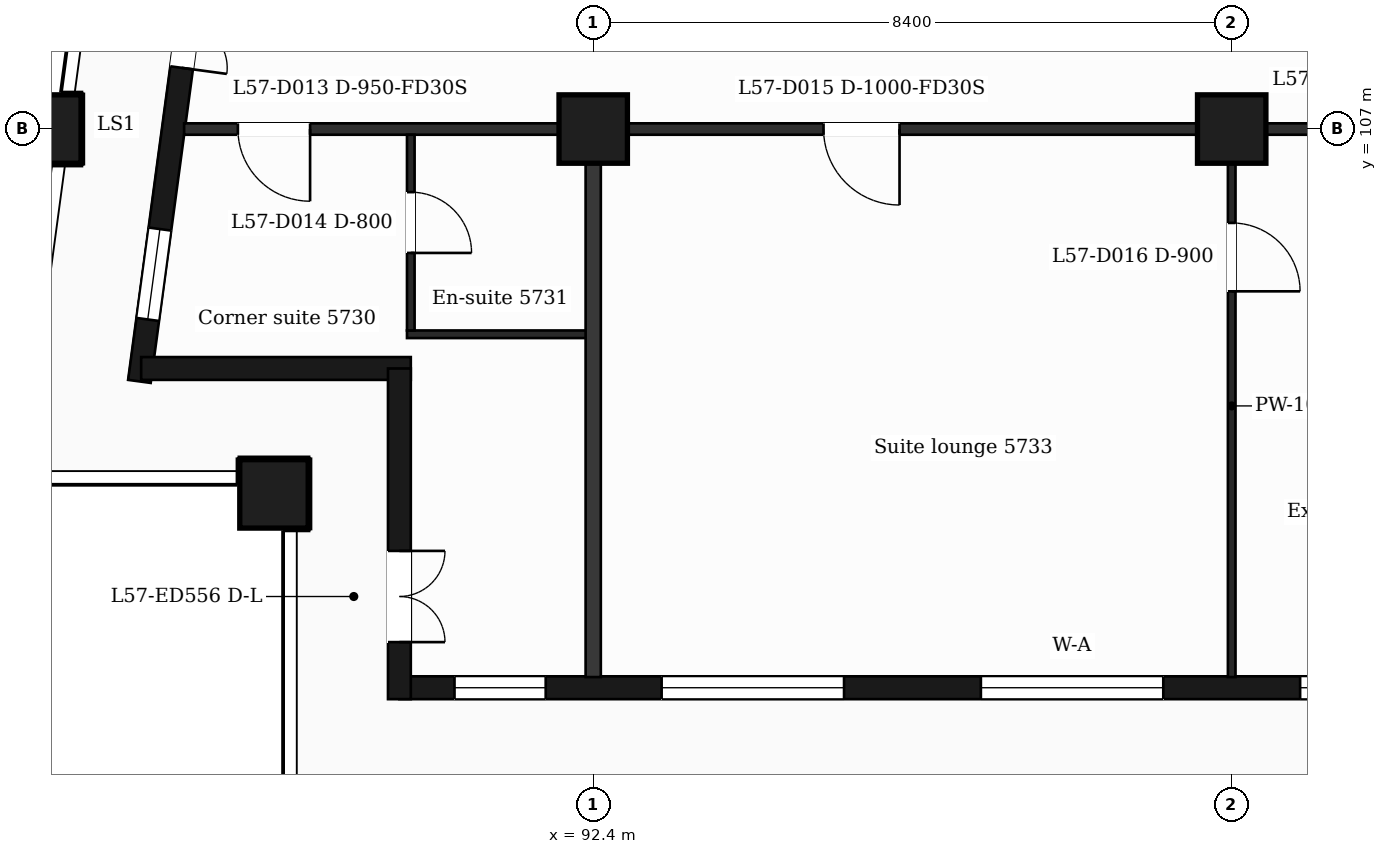
"""IFC4 building model, lengths in metres.
Left out: names, types, materials, properties, quantities, classifications, styles, units other than length and angle.
Written with IfcOpenShell. Run it as: python <this file> out.ifc"""

import sys

from ifc_helpers import new_model, si_unit, direction, frame, frame_2d, origin, origin_2d, place, context, subcontext, project, spatial, rectangle, extrude, element, fill, save


model = new_model("IFC4")
c1 = context("Model", 3, precision=1e-05, world=origin(), true_north=direction((0.0, 1.0)))
c2 = subcontext(c1, "Body", "Model", "MODEL_VIEW")
j1 = project(units=[si_unit("LENGTHUNIT", "METRE"), si_unit("PLANEANGLEUNIT", "RADIAN")], contexts=[c1])
p1 = place(None, origin())
s1 = spatial("IfcSite", under=j1, at=p1, CompositionType="ELEMENT")
p2 = place(p1, origin())
s2 = spatial("IfcBuilding", under=s1, at=p2, CompositionType="ELEMENT")
p3 = place(p2, frame((0.0, 0.0, 235.5)))
s3 = spatial("IfcBuildingStorey", under=s2, at=p3, CompositionType="ELEMENT", Elevation=235.5)
for number, where, z_axis, x_axis in (
    (1, (88.2, 102.2, 0.0), (0.0, 0.0, 1.0), (1.0, 0.0, 0.0)),
    (2, (92.4, 107.0, 0.0), (0.0, 0.0, 1.0), (1.0, 0.0, 0.0)),
    (3, (100.8, 107.0, 0.0), (0.0, 0.0, 1.0), (1.0, 0.0, 0.0)),
    (4, (85.211, 107.0, 0.0), (0.0, 0.0, 1.0), (1.0, 0.0, 0.0)),
):
    element("IfcColumn", number, at=place(p3, frame(where, z_axis=z_axis, x_axis=x_axis)), inside=s3, PredefinedType="COLUMN", context=c2, shape_type="SweptSolid", body=[
        extrude(rectangle(XDim=0.9, YDim=0.9, at=origin_2d()), origin(), (0.0, 0.0, 1.0), 3.7),
    ])
p4 = place(p3, frame((89.85, 99.65, 0.0), z_axis=(0.0, 0.0, 1.0), x_axis=(1.0, 0.0, 0.0)))
e5 = element("IfcWall", 5, at=p4, inside=s3, PredefinedType="SOLIDWALL", context=c2, shape_type="SweptSolid", body=[
    extrude(rectangle(XDim=47.25, YDim=0.3, at=frame_2d((23.625, 0.0))), origin(), (0.0, 0.0, 1.0), 3.38),
])
p5 = place(p4, frame((0.725, 0.0, 0.9)))
e6 = element("IfcOpeningElement", 6, at=p5, cuts=e5, PredefinedType="OPENING", context=c2, shape_type="SweptSolid", body=[
    extrude(rectangle(XDim=1.2, YDim=2.1, at=frame_2d((0.6, 1.05))), frame((0.0, 0.16, 0.0), z_axis=(0.0, -1.0, 0.0), x_axis=(1.0, 0.0, 0.0)), (0.0, 0.0, 1.0), 0.32),
])
p6 = place(p4, frame((3.45, 0.0, 0.9)))
e7 = element("IfcOpeningElement", 7, at=p6, cuts=e5, PredefinedType="OPENING", context=c2, shape_type="SweptSolid", body=[
    extrude(rectangle(XDim=2.4, YDim=2.1, at=frame_2d((1.2, 1.05))), frame((0.0, 0.16, 0.0), z_axis=(0.0, -1.0, 0.0), x_axis=(1.0, 0.0, 0.0)), (0.0, 0.0, 1.0), 0.32),
])
p7 = place(p4, frame((7.65, 0.0, 0.9)))
e8 = element("IfcOpeningElement", 8, at=p7, cuts=e5, PredefinedType="OPENING", context=c2, shape_type="SweptSolid", body=[
    extrude(rectangle(XDim=2.4, YDim=2.1, at=frame_2d((1.2, 1.05))), frame((0.0, 0.16, 0.0), z_axis=(0.0, -1.0, 0.0), x_axis=(1.0, 0.0, 0.0)), (0.0, 0.0, 1.0), 0.32),
])
p8 = place(p4, frame((11.85, 0.0, 0.9)))
e9 = element("IfcOpeningElement", 9, at=p8, cuts=e5, PredefinedType="OPENING", context=c2, shape_type="SweptSolid", body=[
    extrude(rectangle(XDim=2.4, YDim=2.1, at=frame_2d((1.2, 1.05))), frame((0.0, 0.16, 0.0), z_axis=(0.0, -1.0, 0.0), x_axis=(1.0, 0.0, 0.0)), (0.0, 0.0, 1.0), 0.32),
])
p9 = place(p4, frame((16.05, 0.0, 0.9)))
e10 = element("IfcOpeningElement", 10, at=p9, cuts=e5, PredefinedType="OPENING", context=c2, shape_type="SweptSolid", body=[
    extrude(rectangle(XDim=2.4, YDim=2.1, at=frame_2d((1.2, 1.05))), frame((0.0, 0.16, 0.0), z_axis=(0.0, -1.0, 0.0), x_axis=(1.0, 0.0, 0.0)), (0.0, 0.0, 1.0), 0.32),
])
p10 = place(p4, frame((20.25, 0.0, 0.9)))
e11 = element("IfcOpeningElement", 11, at=p10, cuts=e5, PredefinedType="OPENING", context=c2, shape_type="SweptSolid", body=[
    extrude(rectangle(XDim=2.4, YDim=2.1, at=frame_2d((1.2, 1.05))), frame((0.0, 0.16, 0.0), z_axis=(0.0, -1.0, 0.0), x_axis=(1.0, 0.0, 0.0)), (0.0, 0.0, 1.0), 0.32),
])
p11 = place(p4, frame((25.05, 0.0, 0.9)))
e12 = element("IfcOpeningElement", 12, at=p11, cuts=e5, PredefinedType="OPENING", context=c2, shape_type="SweptSolid", body=[
    extrude(rectangle(XDim=1.2, YDim=2.1, at=frame_2d((0.6, 1.05))), frame((0.0, 0.16, 0.0), z_axis=(0.0, -1.0, 0.0), x_axis=(1.0, 0.0, 0.0)), (0.0, 0.0, 1.0), 0.32),
])
p12 = place(p4, frame((29.25, 0.0, 0.9)))
e13 = element("IfcOpeningElement", 13, at=p12, cuts=e5, PredefinedType="OPENING", context=c2, shape_type="SweptSolid", body=[
    extrude(rectangle(XDim=1.2, YDim=2.1, at=frame_2d((0.6, 1.05))), frame((0.0, 0.16, 0.0), z_axis=(0.0, -1.0, 0.0), x_axis=(1.0, 0.0, 0.0)), (0.0, 0.0, 1.0), 0.32),
])
p13 = place(p4, frame((32.55, 0.0, 0.0)))
e14 = element("IfcOpeningElement", 14, at=p13, cuts=e5, PredefinedType="OPENING", context=c2, shape_type="SweptSolid", body=[
    extrude(rectangle(XDim=1.2, YDim=2.4, at=frame_2d((0.6, 1.2))), frame((0.0, 0.16, 0.0), z_axis=(0.0, -1.0, 0.0), x_axis=(1.0, 0.0, 0.0)), (0.0, 0.0, 1.0), 0.32),
])
p14 = place(p4, frame((34.35, 0.0, 0.9)))
e15 = element("IfcOpeningElement", 15, at=p14, cuts=e5, PredefinedType="OPENING", context=c2, shape_type="SweptSolid", body=[
    extrude(rectangle(XDim=1.2, YDim=2.1, at=frame_2d((0.6, 1.05))), frame((0.0, 0.16, 0.0), z_axis=(0.0, -1.0, 0.0), x_axis=(1.0, 0.0, 0.0)), (0.0, 0.0, 1.0), 0.32),
])
p15 = place(p4, frame((37.05, 0.0, 0.9)))
e16 = element("IfcOpeningElement", 16, at=p15, cuts=e5, PredefinedType="OPENING", context=c2, shape_type="SweptSolid", body=[
    extrude(rectangle(XDim=2.4, YDim=2.1, at=frame_2d((1.2, 1.05))), frame((0.0, 0.16, 0.0), z_axis=(0.0, -1.0, 0.0), x_axis=(1.0, 0.0, 0.0)), (0.0, 0.0, 1.0), 0.32),
])
p16 = place(p4, frame((40.95, 0.0, 0.0)))
e17 = element("IfcOpeningElement", 17, at=p16, cuts=e5, PredefinedType="OPENING", context=c2, shape_type="SweptSolid", body=[
    extrude(rectangle(XDim=1.2, YDim=2.4, at=frame_2d((0.6, 1.2))), frame((0.0, 0.16, 0.0), z_axis=(0.0, -1.0, 0.0), x_axis=(1.0, 0.0, 0.0)), (0.0, 0.0, 1.0), 0.32),
])
p17 = place(p4, frame((42.75, 0.0, 0.9)))
e18 = element("IfcOpeningElement", 18, at=p17, cuts=e5, PredefinedType="OPENING", context=c2, shape_type="SweptSolid", body=[
    extrude(rectangle(XDim=1.2, YDim=2.1, at=frame_2d((0.6, 1.05))), frame((0.0, 0.16, 0.0), z_axis=(0.0, -1.0, 0.0), x_axis=(1.0, 0.0, 0.0)), (0.0, 0.0, 1.0), 0.32),
])
p18 = place(p4, frame((45.25, 0.0, 0.9)))
e19 = element("IfcOpeningElement", 19, at=p18, cuts=e5, PredefinedType="OPENING", context=c2, shape_type="SweptSolid", body=[
    extrude(rectangle(XDim=1.2, YDim=2.1, at=frame_2d((0.6, 1.05))), frame((0.0, 0.16, 0.0), z_axis=(0.0, -1.0, 0.0), x_axis=(1.0, 0.0, 0.0)), (0.0, 0.0, 1.0), 0.32),
])
p19 = place(p3, frame((87.334, 110.4, 0.0), z_axis=(0.0, 0.0, 1.0), x_axis=(-0.133437175554, -0.991057273915, 0.0)))
e20 = element("IfcWall", 20, at=p19, inside=s3, PredefinedType="SOLIDWALL", context=c2, shape_type="SweptSolid", body=[
    extrude(rectangle(XDim=6.781, YDim=0.3, at=frame_2d((3.39, 0.0))), origin(), (0.0, 0.0, 1.0), 3.38),
])
p20 = place(p19, frame((1.418, 0.0, 0.0)))
e21 = element("IfcOpeningElement", 21, at=p20, cuts=e20, PredefinedType="OPENING", context=c2, shape_type="SweptSolid", body=[
    extrude(rectangle(XDim=1.2, YDim=2.4, at=frame_2d((0.6, 1.2))), frame((0.0, 0.16, 0.0), z_axis=(0.0, -1.0, 0.0), x_axis=(1.0, 0.0, 0.0)), (0.0, 0.0, 1.0), 0.32),
])
p21 = place(p19, frame((4.758, 0.0, 0.9)))
e22 = element("IfcOpeningElement", 22, at=p21, cuts=e20, PredefinedType="OPENING", context=c2, shape_type="SweptSolid", body=[
    extrude(rectangle(XDim=1.2, YDim=2.1, at=frame_2d((0.6, 1.05))), frame((0.0, 0.16, 0.0), z_axis=(0.0, -1.0, 0.0), x_axis=(1.0, 0.0, 0.0)), (0.0, 0.0, 1.0), 0.32),
])
p22 = place(p3, frame((86.452, 103.85, 0.0), z_axis=(0.0, 0.0, 1.0), x_axis=(1.0, 0.0, 0.0)))
e23 = element("IfcWall", 23, at=p22, inside=s3, PredefinedType="SOLIDWALL", context=c2, shape_type="SweptSolid", body=[
    extrude(rectangle(XDim=3.548, YDim=0.3, at=frame_2d((1.774, 0.0))), origin(), (0.0, 0.0, 1.0), 3.38),
])
p23 = place(p3, frame((89.85, 103.85, 0.0), z_axis=(0.0, 0.0, 1.0), x_axis=(0.0, -1.0, 0.0)))
e24 = element("IfcWall", 24, at=p23, inside=s3, PredefinedType="SOLIDWALL", context=c2, shape_type="SweptSolid", body=[
    extrude(rectangle(XDim=4.35, YDim=0.3, at=frame_2d((2.175, 0.0))), origin(), (0.0, 0.0, 1.0), 3.38),
])
p24 = place(p23, frame((2.4, 0.0, 0.0)))
e25 = element("IfcOpeningElement", 25, at=p24, cuts=e24, PredefinedType="OPENING", context=c2, shape_type="SweptSolid", body=[
    extrude(rectangle(XDim=1.2, YDim=2.4, at=frame_2d((0.6, 1.2))), frame((0.0, 0.16, 0.0), z_axis=(0.0, -1.0, 0.0), x_axis=(1.0, 0.0, 0.0)), (0.0, 0.0, 1.0), 0.32),
])
p25 = place(p3, frame((89.95, 104.3, 0.0), z_axis=(0.0, 0.0, 1.0), x_axis=(1.0, 0.0, 0.0)))
e26 = element("IfcWall", 26, at=p25, inside=s3, PredefinedType="PARTITIONING", context=c2, shape_type="SweptSolid", body=[
    extrude(rectangle(XDim=2.45, YDim=0.1, at=frame_2d((1.225, 0.0))), origin(), (0.0, 0.0, 1.0), 3.38),
])
p26 = place(p3, frame((87.018, 107.0, 0.0), z_axis=(0.0, 0.0, 1.0), x_axis=(1.0, 0.0, 0.0)))
e27 = element("IfcWall", 27, at=p26, inside=s3, PredefinedType="PARTITIONING", context=c2, shape_type="SweptSolid", body=[
    extrude(rectangle(XDim=52.765, YDim=0.15, at=frame_2d((26.382, 0.0))), origin(), (0.0, 0.0, 1.0), 3.38),
])
p27 = place(p26, frame((0.707, 0.0, 0.0)))
e28 = element("IfcOpeningElement", 28, at=p27, cuts=e27, PredefinedType="OPENING", context=c2, shape_type="SweptSolid", body=[
    extrude(rectangle(XDim=0.95, YDim=2.1, at=frame_2d((0.475, 1.05))), frame((0.0, 0.085, 0.0), z_axis=(0.0, -1.0, 0.0), x_axis=(1.0, 0.0, 0.0)), (0.0, 0.0, 1.0), 0.17),
])
p28 = place(p26, frame((8.412, 0.0, 0.0)))
e29 = element("IfcOpeningElement", 29, at=p28, cuts=e27, PredefinedType="OPENING", context=c2, shape_type="SweptSolid", body=[
    extrude(rectangle(XDim=1.0, YDim=2.1, at=frame_2d((0.5, 1.05))), frame((0.0, 0.085, 0.0), z_axis=(0.0, -1.0, 0.0), x_axis=(1.0, 0.0, 0.0)), (0.0, 0.0, 1.0), 0.17),
])
p29 = place(p26, frame((20.482, 0.0, 0.0)))
e30 = element("IfcOpeningElement", 30, at=p29, cuts=e27, PredefinedType="OPENING", context=c2, shape_type="SweptSolid", body=[
    extrude(rectangle(XDim=1.0, YDim=2.1, at=frame_2d((0.5, 1.05))), frame((0.0, 0.085, 0.0), z_axis=(0.0, -1.0, 0.0), x_axis=(1.0, 0.0, 0.0)), (0.0, 0.0, 1.0), 0.17),
])
p30 = place(p26, frame((22.882, 0.0, 0.0)))
e31 = element("IfcOpeningElement", 31, at=p30, cuts=e27, PredefinedType="OPENING", context=c2, shape_type="SweptSolid", body=[
    extrude(rectangle(XDim=1.0, YDim=2.1, at=frame_2d((0.5, 1.05))), frame((0.0, 0.085, 0.0), z_axis=(0.0, -1.0, 0.0), x_axis=(1.0, 0.0, 0.0)), (0.0, 0.0, 1.0), 0.17),
])
p31 = place(p26, frame((32.607, 0.0, 0.0)))
e32 = element("IfcOpeningElement", 32, at=p31, cuts=e27, PredefinedType="OPENING", context=c2, shape_type="SweptSolid", body=[
    extrude(rectangle(XDim=1.0, YDim=2.1, at=frame_2d((0.5, 1.05))), frame((0.0, 0.085, 0.0), z_axis=(0.0, -1.0, 0.0), x_axis=(1.0, 0.0, 0.0)), (0.0, 0.0, 1.0), 0.17),
])
p32 = place(p26, frame((39.707, 0.0, 0.0)))
e33 = element("IfcOpeningElement", 33, at=p32, cuts=e27, PredefinedType="OPENING", context=c2, shape_type="SweptSolid", body=[
    extrude(rectangle(XDim=0.95, YDim=2.1, at=frame_2d((0.475, 1.05))), frame((0.0, 0.085, 0.0), z_axis=(0.0, -1.0, 0.0), x_axis=(1.0, 0.0, 0.0)), (0.0, 0.0, 1.0), 0.17),
])
p33 = place(p26, frame((43.457, 0.0, 0.0)))
e34 = element("IfcOpeningElement", 34, at=p33, cuts=e27, PredefinedType="OPENING", context=c2, shape_type="SweptSolid", body=[
    extrude(rectangle(XDim=0.95, YDim=2.1, at=frame_2d((0.475, 1.05))), frame((0.0, 0.085, 0.0), z_axis=(0.0, -1.0, 0.0), x_axis=(1.0, 0.0, 0.0)), (0.0, 0.0, 1.0), 0.17),
])
p34 = place(p26, frame((49.285, 0.0, 0.0)))
e35 = element("IfcOpeningElement", 35, at=p34, cuts=e27, PredefinedType="OPENING", context=c2, shape_type="SweptSolid", body=[
    extrude(rectangle(XDim=0.95, YDim=2.1, at=frame_2d((0.475, 1.05))), frame((0.0, 0.085, 0.0), z_axis=(0.0, -1.0, 0.0), x_axis=(1.0, 0.0, 0.0)), (0.0, 0.0, 1.0), 0.17),
])
p35 = place(p3, frame((90.0, 104.35, 0.0), z_axis=(0.0, 0.0, 1.0), x_axis=(0.0, 1.0, 0.0)))
e36 = element("IfcWall", 36, at=p35, inside=s3, PredefinedType="PARTITIONING", context=c2, shape_type="SweptSolid", body=[
    extrude(rectangle(XDim=2.575, YDim=0.1, at=frame_2d((1.288, 0.0))), origin(), (0.0, 0.0, 1.0), 3.38),
])
p36 = place(p35, frame((1.02, 0.0, 0.0)))
e37 = element("IfcOpeningElement", 37, at=p36, cuts=e36, PredefinedType="OPENING", context=c2, shape_type="SweptSolid", body=[
    extrude(rectangle(XDim=0.8, YDim=2.1, at=frame_2d((0.4, 1.05))), frame((0.0, 0.06, 0.0), z_axis=(0.0, -1.0, 0.0), x_axis=(1.0, 0.0, 0.0)), (0.0, 0.0, 1.0), 0.12),
])
p37 = place(p3, frame((92.4, 99.79, 0.0), z_axis=(0.0, 0.0, 1.0), x_axis=(0.0, 1.0, 0.0)))
e38 = element("IfcWall", 38, at=p37, inside=s3, PredefinedType="PARTITIONING", context=c2, shape_type="SweptSolid", body=[
    extrude(rectangle(XDim=7.135, YDim=0.2, at=frame_2d((3.567, 0.0))), origin(), (0.0, 0.0, 1.0), 3.38),
])
p38 = place(p3, frame((100.8, 99.79, 0.0), z_axis=(0.0, 0.0, 1.0), x_axis=(0.0, 1.0, 0.0)))
e39 = element("IfcWall", 39, at=p38, inside=s3, PredefinedType="PARTITIONING", context=c2, shape_type="SweptSolid", body=[
    extrude(rectangle(XDim=7.135, YDim=0.1, at=frame_2d((3.567, 0.0))), origin(), (0.0, 0.0, 1.0), 3.38),
])
p39 = place(p38, frame((5.075, 0.0, 0.0)))
e40 = element("IfcOpeningElement", 40, at=p39, cuts=e39, PredefinedType="OPENING", context=c2, shape_type="SweptSolid", body=[
    extrude(rectangle(XDim=0.9, YDim=2.1, at=frame_2d((0.45, 1.05))), frame((0.0, 0.06, 0.0), z_axis=(0.0, -1.0, 0.0), x_axis=(1.0, 0.0, 0.0)), (0.0, 0.0, 1.0), 0.12),
])
p40 = place(p5, origin())
e41 = element("IfcWindow", 41, at=p40, inside=s3, PartitioningType="SINGLE_PANEL", PredefinedType="WINDOW", context=c2, shape_type="SweptSolid", body=[
    extrude(rectangle(XDim=1.2, YDim=2.1, at=frame_2d((0.6, 1.05))), frame((0.0, 0.03, 0.0), z_axis=(0.0, -1.0, 0.0), x_axis=(1.0, 0.0, 0.0)), (0.0, 0.0, 1.0), 0.06),
])
fill(e6, e41)
p41 = place(p6, origin())
e42 = element("IfcWindow", 42, at=p41, inside=s3, PartitioningType="SINGLE_PANEL", PredefinedType="WINDOW", context=c2, shape_type="SweptSolid", body=[
    extrude(rectangle(XDim=2.4, YDim=2.1, at=frame_2d((1.2, 1.05))), frame((0.0, 0.03, 0.0), z_axis=(0.0, -1.0, 0.0), x_axis=(1.0, 0.0, 0.0)), (0.0, 0.0, 1.0), 0.06),
])
fill(e7, e42)
p42 = place(p7, origin())
e43 = element("IfcWindow", 43, at=p42, inside=s3, PartitioningType="SINGLE_PANEL", PredefinedType="WINDOW", context=c2, shape_type="SweptSolid", body=[
    extrude(rectangle(XDim=2.4, YDim=2.1, at=frame_2d((1.2, 1.05))), frame((0.0, 0.03, 0.0), z_axis=(0.0, -1.0, 0.0), x_axis=(1.0, 0.0, 0.0)), (0.0, 0.0, 1.0), 0.06),
])
fill(e8, e43)
p43 = place(p8, origin())
e44 = element("IfcWindow", 44, at=p43, inside=s3, PartitioningType="SINGLE_PANEL", PredefinedType="WINDOW", context=c2, shape_type="SweptSolid", body=[
    extrude(rectangle(XDim=2.4, YDim=2.1, at=frame_2d((1.2, 1.05))), frame((0.0, 0.03, 0.0), z_axis=(0.0, -1.0, 0.0), x_axis=(1.0, 0.0, 0.0)), (0.0, 0.0, 1.0), 0.06),
])
fill(e9, e44)
p44 = place(p20, origin())
e45 = element("IfcDoor", 45, at=p44, inside=s3, OperationType="DOUBLE_DOOR_SINGLE_SWING", PredefinedType="DOOR", context=c2, shape_type="SweptSolid", body=[
    extrude(rectangle(XDim=1.2, YDim=2.4, at=frame_2d((0.6, 1.2))), frame((0.0, 0.025, 0.0), z_axis=(0.0, -1.0, 0.0), x_axis=(1.0, 0.0, 0.0)), (0.0, 0.0, 1.0), 0.05),
])
fill(e21, e45)
p45 = place(p21, origin())
e46 = element("IfcWindow", 46, at=p45, inside=s3, PartitioningType="SINGLE_PANEL", PredefinedType="WINDOW", context=c2, shape_type="SweptSolid", body=[
    extrude(rectangle(XDim=1.2, YDim=2.1, at=frame_2d((0.6, 1.05))), frame((0.0, 0.03, 0.0), z_axis=(0.0, -1.0, 0.0), x_axis=(1.0, 0.0, 0.0)), (0.0, 0.0, 1.0), 0.06),
])
fill(e22, e46)
p46 = place(p24, origin())
e47 = element("IfcDoor", 47, at=p46, inside=s3, OperationType="DOUBLE_DOOR_SINGLE_SWING", PredefinedType="DOOR", context=c2, shape_type="SweptSolid", body=[
    extrude(rectangle(XDim=1.2, YDim=2.4, at=frame_2d((0.6, 1.2))), frame((0.0, 0.025, 0.0), z_axis=(0.0, -1.0, 0.0), x_axis=(1.0, 0.0, 0.0)), (0.0, 0.0, 1.0), 0.05),
])
fill(e25, e47)
p47 = place(p27, origin())
e48 = element("IfcDoor", 48, at=p47, inside=s3, OperationType="SINGLE_SWING_RIGHT", PredefinedType="DOOR", context=c2, shape_type="SweptSolid", body=[
    extrude(rectangle(XDim=0.95, YDim=2.1, at=frame_2d((0.475, 1.05))), frame((0.0, 0.025, 0.0), z_axis=(0.0, -1.0, 0.0), x_axis=(1.0, 0.0, 0.0)), (0.0, 0.0, 1.0), 0.05),
])
fill(e28, e48)
p48 = place(p36, origin())
e49 = element("IfcDoor", 49, at=p48, inside=s3, OperationType="SINGLE_SWING_LEFT", PredefinedType="DOOR", context=c2, shape_type="SweptSolid", body=[
    extrude(rectangle(XDim=0.8, YDim=2.1, at=frame_2d((0.4, 1.05))), frame((0.0, 0.025, 0.0), z_axis=(0.0, -1.0, 0.0), x_axis=(1.0, 0.0, 0.0)), (0.0, 0.0, 1.0), 0.05),
])
fill(e37, e49)
p49 = place(p28, origin())
e50 = element("IfcDoor", 50, at=p49, inside=s3, OperationType="SINGLE_SWING_RIGHT", PredefinedType="DOOR", context=c2, shape_type="SweptSolid", body=[
    extrude(rectangle(XDim=1.0, YDim=2.1, at=frame_2d((0.5, 1.05))), frame((0.0, 0.025, 0.0), z_axis=(0.0, -1.0, 0.0), x_axis=(1.0, 0.0, 0.0)), (0.0, 0.0, 1.0), 0.05),
])
fill(e29, e50)
p50 = place(p39, origin())
e51 = element("IfcDoor", 51, at=p50, inside=s3, OperationType="SINGLE_SWING_LEFT", PredefinedType="DOOR", context=c2, shape_type="SweptSolid", body=[
    extrude(rectangle(XDim=0.9, YDim=2.1, at=frame_2d((0.45, 1.05))), frame((0.0, 0.025, 0.0), z_axis=(0.0, -1.0, 0.0), x_axis=(1.0, 0.0, 0.0)), (0.0, 0.0, 1.0), 0.05),
])
fill(e40, e51)
save(model, sys.argv[1])
